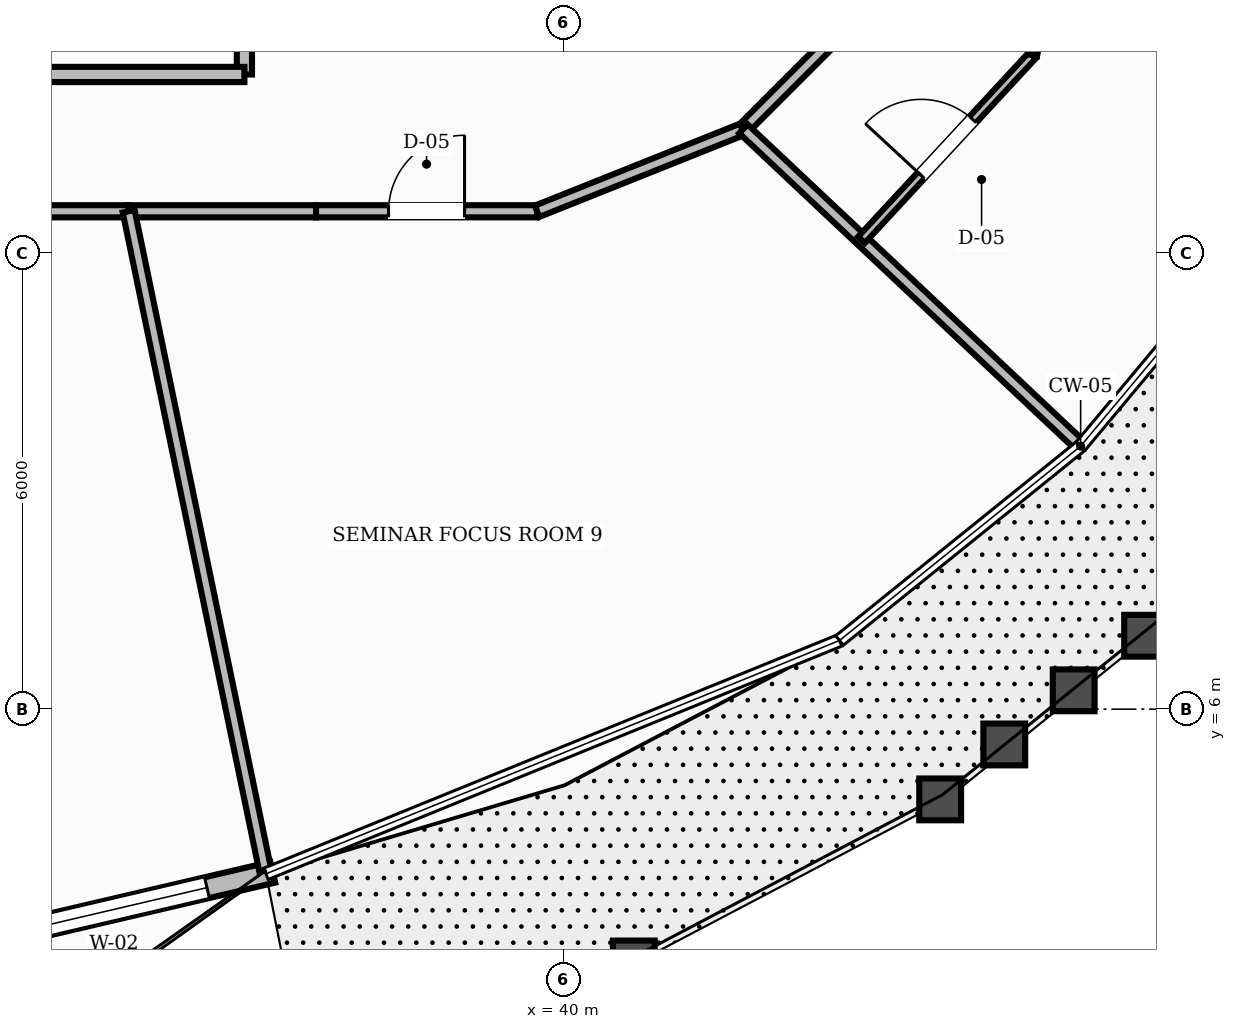
"""IFC4 building model, lengths in metres.
Left out: names, types, materials, properties, quantities, classifications, styles, units other than length and angle.
Written with IfcOpenShell. Run it as: python <this file> out.ifc"""

import sys

from ifc_helpers import new_model, si_unit, direction, frame, frame_2d, origin, place, context, subcontext, project, spatial, rectangle, extrude, element, fill, save


model = new_model("IFC4")
c1 = context("Model", 3, precision=1e-05, world=origin(), true_north=direction((0.0, 1.0)))
c2 = subcontext(c1, "Body", "Model", "MODEL_VIEW")
j1 = project(units=[si_unit("LENGTHUNIT", "METRE"), si_unit("PLANEANGLEUNIT", "RADIAN")], contexts=[c1])
p1 = place(None, origin())
s1 = spatial("IfcSite", under=j1, at=p1, CompositionType="ELEMENT")
p2 = place(p1, origin())
s2 = spatial("IfcBuilding", under=s1, at=p2, CompositionType="ELEMENT")
p3 = place(p2, frame((0.0, 0.0, 243.6)))
s3 = spatial("IfcBuildingStorey", under=s2, at=p3, CompositionType="ELEMENT", Elevation=243.6)
p4 = place(p3, frame((32.0, 2.878, 0.0), z_axis=(0.0, 0.0, 1.0), x_axis=(0.973725543954, 0.227724757223, 0.0)))
e1 = element("IfcWall", 1, at=p4, inside=s3, PredefinedType="STANDARD", context=c2, shape_type="SweptSolid", body=[
    extrude(rectangle(XDim=4.286, YDim=0.28, at=frame_2d((2.143, 0.0))), origin(), (0.0, 0.0, 1.0), 2.88),
])
p5 = place(p4, frame((0.797, 0.0, 0.8)))
e2 = element("IfcOpeningElement", 2, at=p5, cuts=e1, PredefinedType="OPENING", context=c2, shape_type="SweptSolid", body=[
    extrude(rectangle(XDim=2.6, YDim=1.65, at=frame_2d((1.3, 0.825))), frame((0.0, 0.15, 0.0), z_axis=(0.0, -1.0, 0.0), x_axis=(1.0, 0.0, 0.0)), (0.0, 0.0, 1.0), 0.3),
])
p6 = place(p3, frame((35.8, 14.35, 0.0), z_axis=(0.0, 0.0, 1.0), x_axis=(0.0, 1.0, 0.0)))
e3 = element("IfcWall", 3, at=p6, inside=s3, PredefinedType="SOLIDWALL", context=c2, shape_type="SweptSolid", body=[
    extrude(rectangle(XDim=2.2, YDim=0.2, at=frame_2d((1.1, 0.0))), origin(), (0.0, 0.0, 1.0), 2.87),
])
p7 = place(p3, frame((28.2, 14.35, 0.0), z_axis=(0.0, 0.0, 1.0), x_axis=(1.0, 0.0, 0.0)))
e4 = element("IfcWall", 4, at=p7, inside=s3, PredefinedType="SOLIDWALL", context=c2, shape_type="SweptSolid", body=[
    extrude(rectangle(XDim=7.6, YDim=0.2, at=frame_2d((3.8, 0.0))), origin(), (0.0, 0.0, 1.0), 2.87),
])
p8 = place(p7, frame((3.2, 0.0, 0.0)))
e5 = element("IfcOpeningElement", 5, at=p8, cuts=e4, PredefinedType="OPENING", context=c2, shape_type="SweptSolid", body=[
    extrude(rectangle(XDim=1.2, YDim=2.1, at=frame_2d((0.6, 1.05))), frame((0.0, 0.11, 0.0), z_axis=(0.0, -1.0, 0.0), x_axis=(1.0, 0.0, 0.0)), (0.0, 0.0, 1.0), 0.22),
])
p9 = place(p3, frame((32.0, 12.55, 0.0), z_axis=(0.0, 0.0, 1.0), x_axis=(1.0, 0.0, 0.0)))
e6 = element("IfcWall", 6, at=p9, inside=s3, PredefinedType="SOLIDWALL", context=c2, shape_type="SweptSolid", body=[
    extrude(rectangle(XDim=2.278, YDim=0.16, at=frame_2d((1.139, 0.0))), origin(), (0.0, 0.0, 1.0), 2.87),
])
p10 = place(p3, frame((34.278, 12.55, 0.0), z_axis=(0.0, 0.0, 1.0), x_axis=(1.0, 0.0, 0.0)))
e7 = element("IfcWall", 7, at=p10, inside=s3, PredefinedType="SOLIDWALL", context=c2, shape_type="SweptSolid", body=[
    extrude(rectangle(XDim=2.465, YDim=0.16, at=frame_2d((1.232, 0.0))), origin(), (0.0, 0.0, 1.0), 2.87),
])
p11 = place(p3, frame((36.743, 12.55, 0.0), z_axis=(0.0, 0.0, 1.0), x_axis=(1.0, 0.0, 0.0)))
e8 = element("IfcWall", 8, at=p11, inside=s3, PredefinedType="SOLIDWALL", context=c2, shape_type="SweptSolid", body=[
    extrude(rectangle(XDim=2.908, YDim=0.16, at=frame_2d((1.454, 0.0))), origin(), (0.0, 0.0, 1.0), 2.87),
])
p12 = place(p11, frame((0.954, 0.0, 0.0)))
e9 = element("IfcOpeningElement", 9, at=p12, cuts=e8, PredefinedType="OPENING", context=c2, shape_type="SweptSolid", body=[
    extrude(rectangle(XDim=1.0, YDim=2.1, at=frame_2d((0.5, 1.05))), frame((0.0, 0.09, 0.0), z_axis=(0.0, -1.0, 0.0), x_axis=(1.0, 0.0, 0.0)), (0.0, 0.0, 1.0), 0.18),
])
p13 = place(p3, frame((39.651, 12.55, 0.0), z_axis=(0.0, 0.0, 1.0), x_axis=(0.92856882165, 0.371160266542, 0.0)))
e10 = element("IfcWall", 10, at=p13, inside=s3, PredefinedType="SOLIDWALL", context=c2, shape_type="SweptSolid", body=[
    extrude(rectangle(XDim=2.923, YDim=0.16, at=frame_2d((1.461, 0.0))), origin(), (0.0, 0.0, 1.0), 2.87),
])
p14 = place(p3, frame((42.365, 13.635, 0.0), z_axis=(0.0, 0.0, 1.0), x_axis=(0.707106781187, 0.707106781187, 0.0)))
e11 = element("IfcWall", 11, at=p14, inside=s3, PredefinedType="SOLIDWALL", context=c2, shape_type="SweptSolid", body=[
    extrude(rectangle(XDim=2.916, YDim=0.16, at=frame_2d((1.458, 0.0))), origin(), (0.0, 0.0, 1.0), 2.87),
])
p15 = place(p3, frame((42.365, 13.635, 0.0), z_axis=(0.0, 0.0, 1.0), x_axis=(0.728335212041, -0.685221000044, 0.0)))
e12 = element("IfcWall", 12, at=p15, inside=s3, PredefinedType="SOLIDWALL", context=c2, shape_type="SweptSolid", body=[
    extrude(rectangle(XDim=6.042, YDim=0.16, at=frame_2d((3.021, 0.0))), origin(), (0.0, 0.0, 1.0), 2.87),
])
p16 = place(p3, frame((43.918, 12.174, 0.0), z_axis=(0.0, 0.0, 1.0), x_axis=(0.679543218501, 0.733635477733, 0.0)))
e13 = element("IfcWall", 13, at=p16, inside=s3, PredefinedType="PARTITIONING", context=c2, shape_type="SweptSolid", body=[
    extrude(rectangle(XDim=3.313, YDim=0.12, at=frame_2d((1.656, 0.0))), origin(), (0.0, 0.0, 1.0), 2.87),
])
p17 = place(p16, frame((1.156, 0.0, 0.0)))
e14 = element("IfcOpeningElement", 14, at=p17, cuts=e13, PredefinedType="OPENING", context=c2, shape_type="SweptSolid", body=[
    extrude(rectangle(XDim=1.0, YDim=2.1, at=frame_2d((0.5, 1.05))), frame((0.0, 0.07, 0.0), z_axis=(0.0, -1.0, 0.0), x_axis=(1.0, 0.0, 0.0)), (0.0, 0.0, 1.0), 0.14),
])
p18 = place(p3, frame((46.169, 14.604, 0.0), z_axis=(0.0, 0.0, 1.0), x_axis=(0.211961703206, 0.97727797293, 0.0)))
e15 = element("IfcWall", 15, at=p18, inside=s3, PredefinedType="PARTITIONING", context=c2, shape_type="SweptSolid", body=[
    extrude(rectangle(XDim=3.357, YDim=0.12, at=frame_2d((1.679, 0.0))), origin(), (0.0, 0.0, 1.0), 2.87),
])
p19 = place(p3, frame((34.278, 12.55, 0.0), z_axis=(0.0, 0.0, 1.0), x_axis=(0.202911120266, -0.979197159551, 0.0)))
e16 = element("IfcWall", 16, at=p19, inside=s3, PredefinedType="SOLIDWALL", context=c2, shape_type="SweptSolid", body=[
    extrude(rectangle(XDim=8.852, YDim=0.16, at=frame_2d((4.426, 0.0))), origin(), (0.0, 0.0, 1.0), 2.87),
])
p20 = place(p5, origin())
e17 = element("IfcWindow", 17, at=p20, inside=s3, PartitioningType="SINGLE_PANEL", PredefinedType="WINDOW", context=c2, shape_type="SweptSolid", body=[
    extrude(rectangle(XDim=2.6, YDim=1.65, at=frame_2d((1.3, 0.825))), frame((0.0, 0.03, 0.0), z_axis=(0.0, -1.0, 0.0), x_axis=(1.0, 0.0, 0.0)), (0.0, 0.0, 1.0), 0.06),
])
fill(e2, e17)
p21 = place(p17, origin())
e18 = element("IfcDoor", 18, at=p21, inside=s3, OperationType="SINGLE_SWING_LEFT", PredefinedType="DOOR", context=c2, shape_type="SweptSolid", body=[
    extrude(rectangle(XDim=1.0, YDim=2.1, at=frame_2d((0.5, 1.05))), frame((0.0, 0.025, 0.0), z_axis=(0.0, -1.0, 0.0), x_axis=(1.0, 0.0, 0.0)), (0.0, 0.0, 1.0), 0.05),
])
fill(e14, e18)
p22 = place(p12, origin())
e19 = element("IfcDoor", 19, at=p22, inside=s3, OperationType="SINGLE_SWING_RIGHT", PredefinedType="DOOR", context=c2, shape_type="SweptSolid", body=[
    extrude(rectangle(XDim=1.0, YDim=2.1, at=frame_2d((0.5, 1.05))), frame((0.0, 0.025, 0.0), z_axis=(0.0, -1.0, 0.0), x_axis=(1.0, 0.0, 0.0)), (0.0, 0.0, 1.0), 0.05),
])
fill(e9, e19)
save(model, sys.argv[1])
